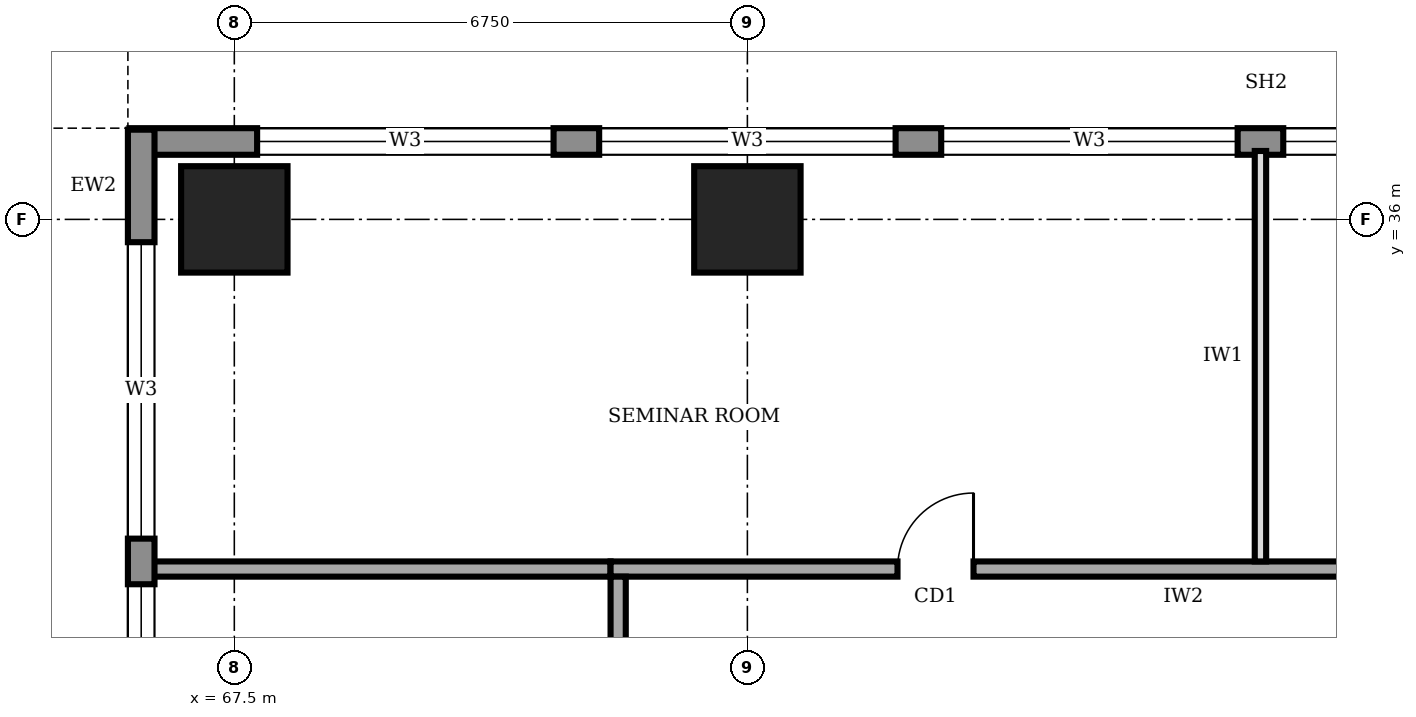
"""IFC4 building model, lengths in metres.
Left out: names, types, materials, properties, quantities, classifications, styles, units other than length and angle.
Written with IfcOpenShell. Run it as: python <this file> out.ifc"""

import sys

from ifc_helpers import new_model, si_unit, direction, frame, frame_2d, origin, origin_2d, place, context, subcontext, project, spatial, rectangle, extrude, element, fill, save


model = new_model("IFC4")
c1 = context("Model", 3, precision=1e-05, world=origin(), true_north=direction((0.0, 1.0)))
c2 = subcontext(c1, "Body", "Model", "MODEL_VIEW")
j1 = project(units=[si_unit("LENGTHUNIT", "METRE"), si_unit("PLANEANGLEUNIT", "RADIAN")], contexts=[c1])
p1 = place(None, origin())
s1 = spatial("IfcSite", under=j1, at=p1, CompositionType="ELEMENT")
p2 = place(p1, origin())
s2 = spatial("IfcBuilding", under=s1, at=p2, CompositionType="ELEMENT")
p3 = place(p2, frame((0.0, 0.0, 201.0)))
s3 = spatial("IfcBuildingStorey", under=s2, at=p3, CompositionType="ELEMENT", Elevation=201.0)
for number, where, z_axis, x_axis in (
    (1, (67.5, 36.0, 0.0), (0.0, 0.0, 1.0), (1.0, 0.0, 0.0)),
    (2, (74.25, 36.0, 0.0), (0.0, 0.0, 1.0), (1.0, 0.0, 0.0)),
):
    element("IfcColumn", number, at=place(p3, frame(where, z_axis=z_axis, x_axis=x_axis)), inside=s3, PredefinedType="COLUMN", context=c2, shape_type="SweptSolid", body=[
        extrude(rectangle(XDim=1.4, YDim=1.4, at=origin_2d()), origin(), (0.0, 0.0, 1.0), 4.0),
    ])
p4 = place(p3, frame((96.03, 37.025, 0.0), z_axis=(0.0, 0.0, 1.0), x_axis=(-1.0, 0.0, 0.0)))
e3 = element("IfcWall", 3, at=p4, inside=s3, PredefinedType="STANDARD", context=c2, shape_type="SweptSolid", body=[
    extrude(rectangle(XDim=29.91, YDim=0.35, at=frame_2d((14.955, 0.0))), origin(), (0.0, 0.0, 1.0), 3.75),
])
p5 = place(p4, frame((24.33, 0.0, 0.95)))
e4 = element("IfcOpeningElement", 4, at=p5, cuts=e3, PredefinedType="OPENING", context=c2, shape_type="SweptSolid", body=[
    extrude(rectangle(XDim=3.9, YDim=1.8, at=frame_2d((1.95, 0.9))), frame((0.0, 0.185, 0.0), z_axis=(0.0, -1.0, 0.0), x_axis=(1.0, 0.0, 0.0)), (0.0, 0.0, 1.0), 0.37),
])
p6 = place(p4, frame((19.83, 0.0, 0.95)))
e5 = element("IfcOpeningElement", 5, at=p6, cuts=e3, PredefinedType="OPENING", context=c2, shape_type="SweptSolid", body=[
    extrude(rectangle(XDim=3.9, YDim=1.8, at=frame_2d((1.95, 0.9))), frame((0.0, 0.185, 0.0), z_axis=(0.0, -1.0, 0.0), x_axis=(1.0, 0.0, 0.0)), (0.0, 0.0, 1.0), 0.37),
])
p7 = place(p4, frame((15.33, 0.0, 0.95)))
e6 = element("IfcOpeningElement", 6, at=p7, cuts=e3, PredefinedType="OPENING", context=c2, shape_type="SweptSolid", body=[
    extrude(rectangle(XDim=3.9, YDim=1.8, at=frame_2d((1.95, 0.9))), frame((0.0, 0.185, 0.0), z_axis=(0.0, -1.0, 0.0), x_axis=(1.0, 0.0, 0.0)), (0.0, 0.0, 1.0), 0.37),
])
p8 = place(p4, frame((10.83, 0.0, 0.95)))
e7 = element("IfcOpeningElement", 7, at=p8, cuts=e3, PredefinedType="OPENING", context=c2, shape_type="SweptSolid", body=[
    extrude(rectangle(XDim=3.9, YDim=1.8, at=frame_2d((1.95, 0.9))), frame((0.0, 0.185, 0.0), z_axis=(0.0, -1.0, 0.0), x_axis=(1.0, 0.0, 0.0)), (0.0, 0.0, 1.0), 0.37),
])
p9 = place(p4, frame((6.33, 0.0, 0.95)))
e8 = element("IfcOpeningElement", 8, at=p9, cuts=e3, PredefinedType="OPENING", context=c2, shape_type="SweptSolid", body=[
    extrude(rectangle(XDim=3.9, YDim=1.8, at=frame_2d((1.95, 0.9))), frame((0.0, 0.185, 0.0), z_axis=(0.0, -1.0, 0.0), x_axis=(1.0, 0.0, 0.0)), (0.0, 0.0, 1.0), 0.37),
])
p10 = place(p4, frame((1.83, 0.0, 0.95)))
e9 = element("IfcOpeningElement", 9, at=p10, cuts=e3, PredefinedType="OPENING", context=c2, shape_type="SweptSolid", body=[
    extrude(rectangle(XDim=3.9, YDim=1.8, at=frame_2d((1.95, 0.9))), frame((0.0, 0.185, 0.0), z_axis=(0.0, -1.0, 0.0), x_axis=(1.0, 0.0, 0.0)), (0.0, 0.0, 1.0), 0.37),
])
p11 = place(p3, frame((66.275, 37.18, 0.0), z_axis=(0.0, 0.0, 1.0), x_axis=(0.0, -1.0, 0.0)))
e10 = element("IfcWall", 10, at=p11, inside=s3, PredefinedType="STANDARD", context=c2, shape_type="SweptSolid", body=[
    extrude(rectangle(XDim=33.86, YDim=0.35, at=frame_2d((16.93, 0.0))), origin(), (0.0, 0.0, 1.0), 3.75),
])
p12 = place(p11, frame((28.48, 0.0, 0.95)))
e11 = element("IfcOpeningElement", 11, at=p12, cuts=e10, PredefinedType="OPENING", context=c2, shape_type="SweptSolid", body=[
    extrude(rectangle(XDim=3.9, YDim=1.8, at=frame_2d((1.95, 0.9))), frame((0.0, 0.185, 0.0), z_axis=(0.0, -1.0, 0.0), x_axis=(1.0, 0.0, 0.0)), (0.0, 0.0, 1.0), 0.37),
])
p13 = place(p11, frame((23.98, 0.0, 0.95)))
e12 = element("IfcOpeningElement", 12, at=p13, cuts=e10, PredefinedType="OPENING", context=c2, shape_type="SweptSolid", body=[
    extrude(rectangle(XDim=3.9, YDim=1.8, at=frame_2d((1.95, 0.9))), frame((0.0, 0.185, 0.0), z_axis=(0.0, -1.0, 0.0), x_axis=(1.0, 0.0, 0.0)), (0.0, 0.0, 1.0), 0.37),
])
p14 = place(p11, frame((19.48, 0.0, 0.95)))
e13 = element("IfcOpeningElement", 13, at=p14, cuts=e10, PredefinedType="OPENING", context=c2, shape_type="SweptSolid", body=[
    extrude(rectangle(XDim=3.9, YDim=1.8, at=frame_2d((1.95, 0.9))), frame((0.0, 0.185, 0.0), z_axis=(0.0, -1.0, 0.0), x_axis=(1.0, 0.0, 0.0)), (0.0, 0.0, 1.0), 0.37),
])
p15 = place(p11, frame((14.98, 0.0, 0.95)))
e14 = element("IfcOpeningElement", 14, at=p15, cuts=e10, PredefinedType="OPENING", context=c2, shape_type="SweptSolid", body=[
    extrude(rectangle(XDim=3.9, YDim=1.8, at=frame_2d((1.95, 0.9))), frame((0.0, 0.185, 0.0), z_axis=(0.0, -1.0, 0.0), x_axis=(1.0, 0.0, 0.0)), (0.0, 0.0, 1.0), 0.37),
])
p16 = place(p11, frame((10.48, 0.0, 0.95)))
e15 = element("IfcOpeningElement", 15, at=p16, cuts=e10, PredefinedType="OPENING", context=c2, shape_type="SweptSolid", body=[
    extrude(rectangle(XDim=3.9, YDim=1.8, at=frame_2d((1.95, 0.9))), frame((0.0, 0.185, 0.0), z_axis=(0.0, -1.0, 0.0), x_axis=(1.0, 0.0, 0.0)), (0.0, 0.0, 1.0), 0.37),
])
p17 = place(p11, frame((5.98, 0.0, 0.95)))
e16 = element("IfcOpeningElement", 16, at=p17, cuts=e10, PredefinedType="OPENING", context=c2, shape_type="SweptSolid", body=[
    extrude(rectangle(XDim=3.9, YDim=1.8, at=frame_2d((1.95, 0.9))), frame((0.0, 0.185, 0.0), z_axis=(0.0, -1.0, 0.0), x_axis=(1.0, 0.0, 0.0)), (0.0, 0.0, 1.0), 0.37),
])
p18 = place(p11, frame((1.48, 0.0, 0.95)))
e17 = element("IfcOpeningElement", 17, at=p18, cuts=e10, PredefinedType="OPENING", context=c2, shape_type="SweptSolid", body=[
    extrude(rectangle(XDim=3.9, YDim=1.8, at=frame_2d((1.95, 0.9))), frame((0.0, 0.185, 0.0), z_axis=(0.0, -1.0, 0.0), x_axis=(1.0, 0.0, 0.0)), (0.0, 0.0, 1.0), 0.37),
])
p19 = place(p3, frame((89.35, 31.4, 0.0), z_axis=(0.0, 0.0, 1.0), x_axis=(-1.0, 0.0, 0.0)))
e18 = element("IfcWall", 18, at=p19, inside=s3, PredefinedType="SOLIDWALL", context=c2, shape_type="SweptSolid", body=[
    extrude(rectangle(XDim=16.9, YDim=0.2, at=frame_2d((8.45, 0.0))), origin(), (0.0, 0.0, 1.0), 3.75),
])
p20 = place(p19, frame((12.125, 0.0, 0.0)))
e19 = element("IfcOpeningElement", 19, at=p20, cuts=e18, PredefinedType="OPENING", context=c2, shape_type="SweptSolid", body=[
    extrude(rectangle(XDim=1.0, YDim=2.1, at=frame_2d((0.5, 1.05))), frame((0.0, 0.11, 0.0), z_axis=(0.0, -1.0, 0.0), x_axis=(1.0, 0.0, 0.0)), (0.0, 0.0, 1.0), 0.22),
])
p21 = place(p19, frame((5.6, 0.0, 0.0)))
e20 = element("IfcOpeningElement", 20, at=p21, cuts=e18, PredefinedType="OPENING", context=c2, shape_type="SweptSolid", body=[
    extrude(rectangle(XDim=1.0, YDim=2.1, at=frame_2d((0.5, 1.05))), frame((0.0, 0.11, 0.0), z_axis=(0.0, -1.0, 0.0), x_axis=(1.0, 0.0, 0.0)), (0.0, 0.0, 1.0), 0.22),
])
p22 = place(p19, frame((1.325, 0.0, 0.0)))
e21 = element("IfcOpeningElement", 21, at=p22, cuts=e18, PredefinedType="OPENING", context=c2, shape_type="SweptSolid", body=[
    extrude(rectangle(XDim=1.0, YDim=2.1, at=frame_2d((0.5, 1.05))), frame((0.0, 0.11, 0.0), z_axis=(0.0, -1.0, 0.0), x_axis=(1.0, 0.0, 0.0)), (0.0, 0.0, 1.0), 0.22),
])
p23 = place(p3, frame((72.55, 31.3, 0.0), z_axis=(0.0, 0.0, 1.0), x_axis=(0.0, -1.0, 0.0)))
e22 = element("IfcWall", 22, at=p23, inside=s3, PredefinedType="SOLIDWALL", context=c2, shape_type="SweptSolid", body=[
    extrude(rectangle(XDim=22.3, YDim=0.2, at=frame_2d((11.15, 0.0))), origin(), (0.0, 0.0, 1.0), 3.75),
])
p24 = place(p23, frame((17.375, 0.0, 0.0)))
e23 = element("IfcOpeningElement", 23, at=p24, cuts=e22, PredefinedType="OPENING", context=c2, shape_type="SweptSolid", body=[
    extrude(rectangle(XDim=1.0, YDim=2.1, at=frame_2d((0.5, 1.05))), frame((0.0, 0.11, 0.0), z_axis=(0.0, -1.0, 0.0), x_axis=(1.0, 0.0, 0.0)), (0.0, 0.0, 1.0), 0.22),
])
p25 = place(p23, frame((10.55, 0.0, 0.0)))
e24 = element("IfcOpeningElement", 24, at=p25, cuts=e22, PredefinedType="OPENING", context=c2, shape_type="SweptSolid", body=[
    extrude(rectangle(XDim=1.0, YDim=2.1, at=frame_2d((0.5, 1.05))), frame((0.0, 0.11, 0.0), z_axis=(0.0, -1.0, 0.0), x_axis=(1.0, 0.0, 0.0)), (0.0, 0.0, 1.0), 0.22),
])
p26 = place(p23, frame((3.725, 0.0, 0.0)))
e25 = element("IfcOpeningElement", 25, at=p26, cuts=e22, PredefinedType="OPENING", context=c2, shape_type="SweptSolid", body=[
    extrude(rectangle(XDim=1.0, YDim=2.1, at=frame_2d((0.5, 1.05))), frame((0.0, 0.11, 0.0), z_axis=(0.0, -1.0, 0.0), x_axis=(1.0, 0.0, 0.0)), (0.0, 0.0, 1.0), 0.22),
])
p27 = place(p3, frame((66.4, 31.4, 0.0), z_axis=(0.0, 0.0, 1.0), x_axis=(1.0, 0.0, 0.0)))
e26 = element("IfcWall", 26, at=p27, inside=s3, PredefinedType="SOLIDWALL", context=c2, shape_type="SweptSolid", body=[
    extrude(rectangle(XDim=6.05, YDim=0.2, at=frame_2d((3.025, 0.0))), origin(), (0.0, 0.0, 1.0), 3.75),
])
p28 = place(p3, frame((81.0, 31.5, 0.0), z_axis=(0.0, 0.0, 1.0), x_axis=(0.0, 1.0, 0.0)))
e27 = element("IfcWall", 27, at=p28, inside=s3, PredefinedType="PARTITIONING", context=c2, shape_type="SweptSolid", body=[
    extrude(rectangle(XDim=5.4, YDim=0.15, at=frame_2d((2.7, 0.0))), origin(), (0.0, 0.0, 1.0), 3.75),
])
p29 = place(p5, origin())
e28 = element("IfcWindow", 28, at=p29, inside=s3, PartitioningType="SINGLE_PANEL", PredefinedType="WINDOW", context=c2, shape_type="SweptSolid", body=[
    extrude(rectangle(XDim=3.9, YDim=1.8, at=frame_2d((1.95, 0.9))), frame((0.0, 0.03, 0.0), z_axis=(0.0, -1.0, 0.0), x_axis=(1.0, 0.0, 0.0)), (0.0, 0.0, 1.0), 0.06),
])
fill(e4, e28)
p30 = place(p6, origin())
e29 = element("IfcWindow", 29, at=p30, inside=s3, PartitioningType="SINGLE_PANEL", PredefinedType="WINDOW", context=c2, shape_type="SweptSolid", body=[
    extrude(rectangle(XDim=3.9, YDim=1.8, at=frame_2d((1.95, 0.9))), frame((0.0, 0.03, 0.0), z_axis=(0.0, -1.0, 0.0), x_axis=(1.0, 0.0, 0.0)), (0.0, 0.0, 1.0), 0.06),
])
fill(e5, e29)
p31 = place(p7, origin())
e30 = element("IfcWindow", 30, at=p31, inside=s3, PartitioningType="SINGLE_PANEL", PredefinedType="WINDOW", context=c2, shape_type="SweptSolid", body=[
    extrude(rectangle(XDim=3.9, YDim=1.8, at=frame_2d((1.95, 0.9))), frame((0.0, 0.03, 0.0), z_axis=(0.0, -1.0, 0.0), x_axis=(1.0, 0.0, 0.0)), (0.0, 0.0, 1.0), 0.06),
])
fill(e6, e30)
p32 = place(p8, origin())
e31 = element("IfcWindow", 31, at=p32, inside=s3, PartitioningType="SINGLE_PANEL", PredefinedType="WINDOW", context=c2, shape_type="SweptSolid", body=[
    extrude(rectangle(XDim=3.9, YDim=1.8, at=frame_2d((1.95, 0.9))), frame((0.0, 0.03, 0.0), z_axis=(0.0, -1.0, 0.0), x_axis=(1.0, 0.0, 0.0)), (0.0, 0.0, 1.0), 0.06),
])
fill(e7, e31)
p33 = place(p17, origin())
e32 = element("IfcWindow", 32, at=p33, inside=s3, PartitioningType="SINGLE_PANEL", PredefinedType="WINDOW", context=c2, shape_type="SweptSolid", body=[
    extrude(rectangle(XDim=3.9, YDim=1.8, at=frame_2d((1.95, 0.9))), frame((0.0, 0.03, 0.0), z_axis=(0.0, -1.0, 0.0), x_axis=(1.0, 0.0, 0.0)), (0.0, 0.0, 1.0), 0.06),
])
fill(e16, e32)
p34 = place(p18, origin())
e33 = element("IfcWindow", 33, at=p34, inside=s3, PartitioningType="SINGLE_PANEL", PredefinedType="WINDOW", context=c2, shape_type="SweptSolid", body=[
    extrude(rectangle(XDim=3.9, YDim=1.8, at=frame_2d((1.95, 0.9))), frame((0.0, 0.03, 0.0), z_axis=(0.0, -1.0, 0.0), x_axis=(1.0, 0.0, 0.0)), (0.0, 0.0, 1.0), 0.06),
])
fill(e17, e33)
p35 = place(p20, frame((1.0, 0.0, 0.0), z_axis=(0.0, 0.0, 1.0), x_axis=(-1.0, 0.0, 0.0)))
e34 = element("IfcDoor", 34, at=p35, inside=s3, OperationType="SINGLE_SWING_RIGHT", PredefinedType="DOOR", context=c2, shape_type="SweptSolid", body=[
    extrude(rectangle(XDim=1.0, YDim=2.1, at=frame_2d((0.5, 1.05))), frame((0.0, 0.025, 0.0), z_axis=(0.0, -1.0, 0.0), x_axis=(1.0, 0.0, 0.0)), (0.0, 0.0, 1.0), 0.05),
])
fill(e19, e34)
save(model, sys.argv[1])
